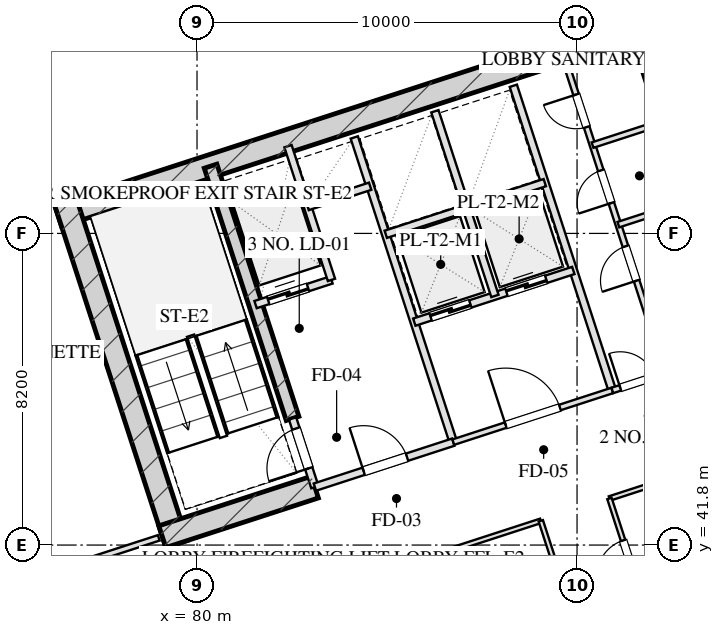
"""IFC4 building model, lengths in metres.
Left out: names, types, materials, properties, quantities, classifications, styles, units other than length and angle.
Written with IfcOpenShell. Run it as: python <this file> out.ifc"""

import sys

from ifc_helpers import new_model, si_unit, direction, frame, frame_2d, origin, place, context, subcontext, project, spatial, rectangle, extrude, element, fill, save


model = new_model("IFC4")
c1 = context("Model", 3, precision=1e-05, world=origin(), true_north=direction((0.0, 1.0)))
c2 = subcontext(c1, "Body", "Model", "MODEL_VIEW")
j1 = project(units=[si_unit("LENGTHUNIT", "METRE"), si_unit("PLANEANGLEUNIT", "RADIAN")], contexts=[c1])
p1 = place(None, origin())
s1 = spatial("IfcSite", under=j1, at=p1, CompositionType="ELEMENT")
p2 = place(p1, origin())
s2 = spatial("IfcBuilding", under=s1, at=p2, CompositionType="ELEMENT")
p3 = place(p2, frame((0.0, 0.0, 117.3)))
s3 = spatial("IfcBuildingStorey", under=s2, at=p3, CompositionType="ELEMENT", Elevation=117.3)
p4 = place(p3, frame((76.344, 50.466, 0.0), z_axis=(0.0, 0.0, 1.0), x_axis=(0.951055727519, 0.309019421968, 0.0)))
e1 = element("IfcWall", 1, at=p4, inside=s3, PredefinedType="SHEAR", context=c2, shape_type="SweptSolid", body=[
    extrude(rectangle(XDim=16.4, YDim=0.6, at=frame_2d((8.2, 0.0))), origin(), (0.0, 0.0, 1.0), 3.45),
])
for number, where, z_axis, x_axis in (
    (2, (79.466, 41.828, 0.0), (0.0, 0.0, 1.0), (-0.309, 0.951, 0.0)),
    (3, (94.492, 46.71, 0.0), (0.0, 0.0, 1.0), (-0.309, 0.951, 0.0)),
):
    element("IfcWall", number, at=place(p3, frame(where, z_axis=z_axis, x_axis=x_axis)), inside=s3, PredefinedType="SHEAR", context=c2, shape_type="SweptSolid", body=[
        extrude(rectangle(XDim=9.48, YDim=0.6, at=frame_2d((4.74, 0.0))), origin(), (0.0, 0.0, 1.0), 3.45),
    ])
p5 = place(p3, frame((82.514, 45.131, 0.0), z_axis=(0.0, 0.0, 1.0), x_axis=(-0.308988790936, 0.951065679686, 0.0)))
e4 = element("IfcWall", 4, at=p5, inside=s3, PredefinedType="SHEAR", context=c2, shape_type="SweptSolid", body=[
    extrude(rectangle(XDim=6.98, YDim=0.35, at=frame_2d((3.49, 0.0))), origin(), (0.0, 0.0, 1.0), 3.45),
])
p6 = place(p3, frame((79.087, 42.021, 0.0), z_axis=(0.0, 0.0, 1.0), x_axis=(0.951062550203, 0.3089984233, 0.0)))
e5 = element("IfcWall", 5, at=p6, inside=s3, PredefinedType="SHEAR", context=c2, shape_type="SweptSolid", body=[
    extrude(rectangle(XDim=4.22, YDim=0.6, at=frame_2d((2.11, 0.0))), origin(), (0.0, 0.0, 1.0), 3.45),
])
p7 = place(p3, frame((80.716, 6.59, 0.0), z_axis=(0.0, 0.0, 1.0), x_axis=(-0.309017542002, 0.95105633836, 0.0)))
e6 = element("IfcWall", 6, at=p7, inside=s3, PredefinedType="SOLIDWALL", context=c2, shape_type="SweptSolid", body=[
    extrude(rectangle(XDim=46.4, YDim=0.4, at=frame_2d((23.2, 0.0))), origin(), (0.0, 0.0, 1.0), 2.61),
])
p8 = place(p7, frame((15.6, 0.0, 0.75)))
e7 = element("IfcOpeningElement", 7, at=p8, cuts=e6, PredefinedType="OPENING", context=c2, shape_type="SweptSolid", body=[
    extrude(rectangle(XDim=2.4, YDim=1.46, at=frame_2d((1.2, 0.73))), frame((0.0, 0.21, 0.0), z_axis=(0.0, -1.0, 0.0), x_axis=(1.0, 0.0, 0.0)), (0.0, 0.0, 1.0), 0.42),
])
p9 = place(p7, frame((28.4, 0.0, 0.75)))
e8 = element("IfcOpeningElement", 8, at=p9, cuts=e6, PredefinedType="OPENING", context=c2, shape_type="SweptSolid", body=[
    extrude(rectangle(XDim=2.4, YDim=1.46, at=frame_2d((1.2, 0.73))), frame((0.0, 0.21, 0.0), z_axis=(0.0, -1.0, 0.0), x_axis=(1.0, 0.0, 0.0)), (0.0, 0.0, 1.0), 0.42),
])
p10 = place(p3, frame((68.047, 53.995, 0.0), z_axis=(0.0, 0.0, 1.0), x_axis=(0.95105505922, 0.309021478754, 0.0)))
e9 = element("IfcWall", 9, at=p10, inside=s3, PredefinedType="SOLIDWALL", context=c2, shape_type="SweptSolid", body=[
    extrude(rectangle(XDim=29.4, YDim=0.4, at=frame_2d((14.7, 0.0))), origin(), (0.0, 0.0, 1.0), 2.61),
])
p11 = place(p3, frame((83.101, 43.324, 0.0), z_axis=(0.0, 0.0, 1.0), x_axis=(-0.309048298632, 0.951046344356, 0.0)))
e10 = element("IfcWall", 10, at=p11, inside=s3, PredefinedType="PARTITIONING", context=c2, shape_type="SweptSolid", body=[
    extrude(rectangle(XDim=1.9, YDim=0.2, at=frame_2d((0.95, 0.0))), origin(), (0.0, 0.0, 1.0), 3.175),
])
p12 = place(p11, frame((0.52, 0.0, 0.0)))
e11 = element("IfcOpeningElement", 11, at=p12, cuts=e10, PredefinedType="OPENING", context=c2, shape_type="SweptSolid", body=[
    extrude(rectangle(XDim=1.1, YDim=2.05, at=frame_2d((0.55, 1.025))), frame((0.0, 0.11, 0.0), z_axis=(0.0, -1.0, 0.0), x_axis=(1.0, 0.0, 0.0)), (0.0, 0.0, 1.0), 0.22),
])
p13 = place(p3, frame((86.743, 44.508, 0.0), z_axis=(0.0, 0.0, 1.0), x_axis=(-0.309016001439, 0.951056838919, 0.0)))
e12 = element("IfcWall", 12, at=p13, inside=s3, PredefinedType="PARTITIONING", context=c2, shape_type="SweptSolid", body=[
    extrude(rectangle(XDim=8.43, YDim=0.2, at=frame_2d((4.215, 0.0))), origin(), (0.0, 0.0, 1.0), 3.175),
])
p14 = place(p3, frame((83.101, 43.324, 0.0), z_axis=(0.0, 0.0, 1.0), x_axis=(0.951052804469, 0.309028417967, 0.0)))
e13 = element("IfcWall", 13, at=p14, inside=s3, PredefinedType="PARTITIONING", context=c2, shape_type="SweptSolid", body=[
    extrude(rectangle(XDim=3.83, YDim=0.2, at=frame_2d((1.915, 0.0))), origin(), (0.0, 0.0, 1.0), 3.175),
])
p15 = place(p14, frame((1.35, 0.0, 0.0)))
e14 = element("IfcOpeningElement", 14, at=p15, cuts=e13, PredefinedType="OPENING", context=c2, shape_type="SweptSolid", body=[
    extrude(rectangle(XDim=1.2, YDim=2.05, at=frame_2d((0.6, 1.025))), frame((0.0, 0.11, 0.0), z_axis=(0.0, -1.0, 0.0), x_axis=(1.0, 0.0, 0.0)), (0.0, 0.0, 1.0), 0.22),
])
p16 = place(p3, frame((81.54, 48.127, 0.0), z_axis=(0.0, 0.0, 1.0), x_axis=(0.951062257173, 0.308999325213, 0.0)))
e15 = element("IfcWall", 15, at=p16, inside=s3, PredefinedType="PARTITIONING", context=c2, shape_type="SweptSolid", body=[
    extrude(rectangle(XDim=2.1, YDim=0.2, at=frame_2d((1.05, 0.0))), origin(), (0.0, 0.0, 1.0), 3.175),
])
p17 = place(p16, frame((0.35, 0.0, 0.0)))
e16 = element("IfcOpeningElement", 16, at=p17, cuts=e15, PredefinedType="OPENING", context=c2, shape_type="SweptSolid", body=[
    extrude(rectangle(XDim=1.1, YDim=2.05, at=frame_2d((0.55, 1.025))), frame((0.0, 0.11, 0.0), z_axis=(0.0, -1.0, 0.0), x_axis=(1.0, 0.0, 0.0)), (0.0, 0.0, 1.0), 0.22),
])
p18 = place(p3, frame((83.538, 48.776, 0.0), z_axis=(0.0, 0.0, 1.0), x_axis=(-0.3089935693, 0.951064127245, 0.0)))
e17 = element("IfcWall", 17, at=p18, inside=s3, PredefinedType="PARTITIONING", context=c2, shape_type="SweptSolid", body=[
    extrude(rectangle(XDim=3.7, YDim=0.2, at=frame_2d((1.85, 0.0))), origin(), (0.0, 0.0, 1.0), 3.175),
])
p19 = place(p3, frame((82.91, 50.707, 0.0), z_axis=(0.0, 0.0, 1.0), x_axis=(0.951041328149, 0.309063734775, 0.0)))
e18 = element("IfcWall", 18, at=p19, inside=s3, PredefinedType="PARTITIONING", context=c2, shape_type="SweptSolid", body=[
    extrude(rectangle(XDim=1.73, YDim=0.2, at=frame_2d((0.865, 0.0))), origin(), (0.0, 0.0, 1.0), 3.175),
])
p20 = place(p3, frame((90.928, 45.868, 0.0), z_axis=(0.0, 0.0, 1.0), x_axis=(-0.309042196757, 0.951048327176, 0.0)))
e19 = element("IfcWall", 19, at=p20, inside=s3, PredefinedType="PARTITIONING", context=c2, shape_type="SweptSolid", body=[
    extrude(rectangle(XDim=8.43, YDim=0.2, at=frame_2d((4.215, 0.0))), origin(), (0.0, 0.0, 1.0), 3.175),
])
p21 = place(p3, frame((86.743, 44.508, 0.0), z_axis=(0.0, 0.0, 1.0), x_axis=(0.951063829732, 0.308994485023, 0.0)))
e20 = element("IfcWall", 20, at=p21, inside=s3, PredefinedType="PARTITIONING", context=c2, shape_type="SweptSolid", body=[
    extrude(rectangle(XDim=4.4, YDim=0.15, at=frame_2d((2.2, 0.0))), origin(), (0.0, 0.0, 1.0), 3.175),
])
p22 = place(p21, frame((1.45, 0.0, 0.0)))
e21 = element("IfcOpeningElement", 21, at=p22, cuts=e20, PredefinedType="OPENING", context=c2, shape_type="SweptSolid", body=[
    extrude(rectangle(XDim=1.5, YDim=2.05, at=frame_2d((0.75, 1.025))), frame((0.0, 0.085, 0.0), z_axis=(0.0, -1.0, 0.0), x_axis=(1.0, 0.0, 0.0)), (0.0, 0.0, 1.0), 0.17),
])
p23 = place(p3, frame((85.718, 47.666, 0.0), z_axis=(0.0, 0.0, 1.0), x_axis=(0.951058531764, 0.30901079133, 0.0)))
e22 = element("IfcWall", 22, at=p23, inside=s3, PredefinedType="PARTITIONING", context=c2, shape_type="SweptSolid", body=[
    extrude(rectangle(XDim=4.4, YDim=0.2, at=frame_2d((2.2, 0.0))), origin(), (0.0, 0.0, 1.0), 3.175),
])
p24 = place(p23, frame((0.45, 0.0, 0.0)))
e23 = element("IfcOpeningElement", 23, at=p24, cuts=e22, PredefinedType="OPENING", context=c2, shape_type="SweptSolid", body=[
    extrude(rectangle(XDim=1.1, YDim=2.05, at=frame_2d((0.55, 1.025))), frame((0.0, 0.11, 0.0), z_axis=(0.0, -1.0, 0.0), x_axis=(1.0, 0.0, 0.0)), (0.0, 0.0, 1.0), 0.22),
])
p25 = place(p23, frame((2.55, 0.0, 0.0)))
e24 = element("IfcOpeningElement", 24, at=p25, cuts=e22, PredefinedType="OPENING", context=c2, shape_type="SweptSolid", body=[
    extrude(rectangle(XDim=1.1, YDim=2.05, at=frame_2d((0.55, 1.025))), frame((0.0, 0.11, 0.0), z_axis=(0.0, -1.0, 0.0), x_axis=(1.0, 0.0, 0.0)), (0.0, 0.0, 1.0), 0.22),
])
p26 = place(p3, frame((87.838, 48.354, 0.0), z_axis=(0.0, 0.0, 1.0), x_axis=(-0.3090093719, 0.951058992953, 0.0)))
e25 = element("IfcWall", 25, at=p26, inside=s3, PredefinedType="PARTITIONING", context=c2, shape_type="SweptSolid", body=[
    extrude(rectangle(XDim=5.11, YDim=0.2, at=frame_2d((2.555, 0.0))), origin(), (0.0, 0.0, 1.0), 3.175),
])
p27 = place(p3, frame((84.967, 49.977, 0.0), z_axis=(0.0, 0.0, 1.0), x_axis=(0.951063829732, 0.308994485023, 0.0)))
e26 = element("IfcWall", 26, at=p27, inside=s3, PredefinedType="PARTITIONING", context=c2, shape_type="SweptSolid", body=[
    extrude(rectangle(XDim=4.4, YDim=0.2, at=frame_2d((2.2, 0.0))), origin(), (0.0, 0.0, 1.0), 3.175),
])
p28 = place(p3, frame((90.928, 45.868, 0.0), z_axis=(0.0, 0.0, 1.0), x_axis=(0.951059297078, 0.309008435874, 0.0)))
e27 = element("IfcWall", 27, at=p28, inside=s3, PredefinedType="PARTITIONING", context=c2, shape_type="SweptSolid", body=[
    extrude(rectangle(XDim=3.2, YDim=0.15, at=frame_2d((1.6, 0.0))), origin(), (0.0, 0.0, 1.0), 3.175),
])
p29 = place(p28, frame((0.22, 0.0, 0.0)))
e28 = element("IfcOpeningElement", 28, at=p29, cuts=e27, PredefinedType="OPENING", context=c2, shape_type="SweptSolid", body=[
    extrude(rectangle(XDim=0.95, YDim=2.05, at=frame_2d((0.475, 1.025))), frame((0.0, 0.085, 0.0), z_axis=(0.0, -1.0, 0.0), x_axis=(1.0, 0.0, 0.0)), (0.0, 0.0, 1.0), 0.17),
])
p30 = place(p3, frame((92.355, 46.331, 0.0), z_axis=(0.0, 0.0, 1.0), x_axis=(-0.309007490203, 0.951059604335, 0.0)))
e29 = element("IfcWall", 29, at=p30, inside=s3, PredefinedType="PARTITIONING", context=c2, shape_type="SweptSolid", body=[
    extrude(rectangle(XDim=8.43, YDim=0.15, at=frame_2d((4.215, 0.0))), origin(), (0.0, 0.0, 1.0), 3.175),
])
p31 = place(p30, frame((2.55, 0.0, 0.0)))
e30 = element("IfcOpeningElement", 30, at=p31, cuts=e29, PredefinedType="OPENING", context=c2, shape_type="SweptSolid", body=[
    extrude(rectangle(XDim=0.95, YDim=2.05, at=frame_2d((0.475, 1.025))), frame((0.0, 0.085, 0.0), z_axis=(0.0, -1.0, 0.0), x_axis=(1.0, 0.0, 0.0)), (0.0, 0.0, 1.0), 0.17),
])
p32 = place(p30, frame((4.7, 0.0, 0.0)))
e31 = element("IfcOpeningElement", 31, at=p32, cuts=e29, PredefinedType="OPENING", context=c2, shape_type="SweptSolid", body=[
    extrude(rectangle(XDim=0.9, YDim=2.05, at=frame_2d((0.45, 1.025))), frame((0.0, 0.085, 0.0), z_axis=(0.0, -1.0, 0.0), x_axis=(1.0, 0.0, 0.0)), (0.0, 0.0, 1.0), 0.17),
])
p33 = place(p30, frame((6.8, 0.0, 0.0)))
e32 = element("IfcOpeningElement", 32, at=p33, cuts=e29, PredefinedType="OPENING", context=c2, shape_type="SweptSolid", body=[
    extrude(rectangle(XDim=0.9, YDim=2.05, at=frame_2d((0.45, 1.025))), frame((0.0, 0.085, 0.0), z_axis=(0.0, -1.0, 0.0), x_axis=(1.0, 0.0, 0.0)), (0.0, 0.0, 1.0), 0.17),
])
p34 = place(p3, frame((91.088, 50.23, 0.0), z_axis=(0.0, 0.0, 1.0), x_axis=(0.951054116971, 0.309024378638, 0.0)))
e33 = element("IfcWall", 33, at=p34, inside=s3, PredefinedType="PARTITIONING", context=c2, shape_type="SweptSolid", body=[
    extrude(rectangle(XDim=1.7, YDim=0.15, at=frame_2d((0.85, 0.0))), origin(), (0.0, 0.0, 1.0), 3.175),
])
p35 = place(p3, frame((90.408, 52.323, 0.0), z_axis=(0.0, 0.0, 1.0), x_axis=(0.951040401051, 0.309066587596, 0.0)))
e34 = element("IfcWall", 34, at=p35, inside=s3, PredefinedType="PARTITIONING", context=c2, shape_type="SweptSolid", body=[
    extrude(rectangle(XDim=1.7, YDim=0.15, at=frame_2d((0.85, 0.0))), origin(), (0.0, 0.0, 1.0), 3.175),
])
p36 = place(p3, frame((70.338, 39.177, 0.0), z_axis=(0.0, 0.0, 1.0), x_axis=(0.951059695568, 0.309007209409, 0.0)))
e35 = element("IfcWall", 35, at=p36, inside=s3, PredefinedType="PARTITIONING", context=c2, shape_type="SweptSolid", body=[
    extrude(rectangle(XDim=9.1, YDim=0.15, at=frame_2d((4.55, 0.0))), origin(), (0.0, 0.0, 1.0), 3.175),
])
p37 = place(p36, frame((3.822, 0.0, 0.0)))
e36 = element("IfcOpeningElement", 36, at=p37, cuts=e35, PredefinedType="OPENING", context=c2, shape_type="SweptSolid", body=[
    extrude(rectangle(XDim=1.05, YDim=2.05, at=frame_2d((0.525, 1.025))), frame((0.0, 0.085, 0.0), z_axis=(0.0, -1.0, 0.0), x_axis=(1.0, 0.0, 0.0)), (0.0, 0.0, 1.0), 0.17),
])
p38 = place(p3, frame((81.532, 39.997, 0.0), z_axis=(0.0, 0.0, 1.0), x_axis=(0.951048148493, 0.309042746635, 0.0)))
e37 = element("IfcWall", 37, at=p38, inside=s3, PredefinedType="PARTITIONING", context=c2, shape_type="SweptSolid", body=[
    extrude(rectangle(XDim=7.9, YDim=0.12, at=frame_2d((3.95, 0.0))), origin(), (0.0, 0.0, 1.0), 3.175),
])
p39 = place(p3, frame((90.853, 43.025, 0.0), z_axis=(0.0, 0.0, 1.0), x_axis=(0.951054001411, 0.309024734286, 0.0)))
e38 = element("IfcWall", 38, at=p39, inside=s3, PredefinedType="PARTITIONING", context=c2, shape_type="SweptSolid", body=[
    extrude(rectangle(XDim=13.5, YDim=0.12, at=frame_2d((6.75, 0.0))), origin(), (0.0, 0.0, 1.0), 3.175),
])
p40 = place(p3, frame((94.188, 26.613, 0.0), z_axis=(0.0, 0.0, 1.0), x_axis=(-0.30901773025, 0.951056277195, 0.0)))
e39 = element("IfcWall", 39, at=p40, inside=s3, PredefinedType="PARTITIONING", context=c2, shape_type="SweptSolid", body=[
    extrude(rectangle(XDim=16.64, YDim=0.12, at=frame_2d((8.32, 0.0))), origin(), (0.0, 0.0, 1.0), 3.175),
])
p41 = place(p40, frame((9.304, 0.0, 0.0)))
e40 = element("IfcOpeningElement", 40, at=p41, cuts=e39, PredefinedType="OPENING", context=c2, shape_type="SweptSolid", body=[
    extrude(rectangle(XDim=1.1, YDim=2.05, at=frame_2d((0.55, 1.025))), frame((0.0, 0.07, 0.0), z_axis=(0.0, -1.0, 0.0), x_axis=(1.0, 0.0, 0.0)), (0.0, 0.0, 1.0), 0.14),
])
p42 = place(p3, frame((95.995, 27.2, 0.0), z_axis=(0.0, 0.0, 1.0), x_axis=(-0.309022042254, 0.951054876125, 0.0)))
e41 = element("IfcWall", 41, at=p42, inside=s3, PredefinedType="PARTITIONING", context=c2, shape_type="SweptSolid", body=[
    extrude(rectangle(XDim=16.64, YDim=0.12, at=frame_2d((8.32, 0.0))), origin(), (0.0, 0.0, 1.0), 3.175),
])
p43 = place(p42, frame((1.16, 0.0, 0.0)))
e42 = element("IfcOpeningElement", 42, at=p43, cuts=e41, PredefinedType="OPENING", context=c2, shape_type="SweptSolid", body=[
    extrude(rectangle(XDim=1.0, YDim=2.05, at=frame_2d((0.5, 1.025))), frame((0.0, 0.07, 0.0), z_axis=(0.0, -1.0, 0.0), x_axis=(1.0, 0.0, 0.0)), (0.0, 0.0, 1.0), 0.14),
])
p44 = place(p42, frame((5.48, 0.0, 0.0)))
e43 = element("IfcOpeningElement", 43, at=p44, cuts=e41, PredefinedType="OPENING", context=c2, shape_type="SweptSolid", body=[
    extrude(rectangle(XDim=1.0, YDim=2.05, at=frame_2d((0.5, 1.025))), frame((0.0, 0.07, 0.0), z_axis=(0.0, -1.0, 0.0), x_axis=(1.0, 0.0, 0.0)), (0.0, 0.0, 1.0), 0.14),
])
p45 = place(p42, frame((9.48, 0.0, 0.0)))
e44 = element("IfcOpeningElement", 44, at=p45, cuts=e41, PredefinedType="OPENING", context=c2, shape_type="SweptSolid", body=[
    extrude(rectangle(XDim=1.0, YDim=2.05, at=frame_2d((0.5, 1.025))), frame((0.0, 0.07, 0.0), z_axis=(0.0, -1.0, 0.0), x_axis=(1.0, 0.0, 0.0)), (0.0, 0.0, 1.0), 0.14),
])
p46 = place(p42, frame((14.48, 0.0, 0.0)))
e45 = element("IfcOpeningElement", 45, at=p46, cuts=e41, PredefinedType="OPENING", context=c2, shape_type="SweptSolid", body=[
    extrude(rectangle(XDim=1.0, YDim=2.05, at=frame_2d((0.5, 1.025))), frame((0.0, 0.07, 0.0), z_axis=(0.0, -1.0, 0.0), x_axis=(1.0, 0.0, 0.0)), (0.0, 0.0, 1.0), 0.14),
])
p47 = place(p12, origin())
e46 = element("IfcDoor", 46, at=p47, inside=s3, OperationType="SINGLE_SWING_LEFT", PredefinedType="DOOR", context=c2, shape_type="SweptSolid", body=[
    extrude(rectangle(XDim=1.1, YDim=2.05, at=frame_2d((0.55, 1.025))), frame((0.0, 0.025, 0.0), z_axis=(0.0, -1.0, 0.0), x_axis=(1.0, 0.0, 0.0)), (0.0, 0.0, 1.0), 0.05),
])
fill(e11, e46)
p48 = place(p15, origin())
e47 = element("IfcDoor", 47, at=p48, inside=s3, OperationType="SINGLE_SWING_LEFT", PredefinedType="DOOR", context=c2, shape_type="SweptSolid", body=[
    extrude(rectangle(XDim=1.2, YDim=2.05, at=frame_2d((0.6, 1.025))), frame((0.0, 0.025, 0.0), z_axis=(0.0, -1.0, 0.0), x_axis=(1.0, 0.0, 0.0)), (0.0, 0.0, 1.0), 0.05),
])
fill(e14, e47)
p49 = place(p17, origin())
e48 = element("IfcDoor", 48, at=p49, inside=s3, OperationType="DOUBLE_DOOR_SLIDING", PredefinedType="DOOR", context=c2, shape_type="SweptSolid", body=[
    extrude(rectangle(XDim=1.1, YDim=2.05, at=frame_2d((0.55, 1.025))), frame((0.0, 0.025, 0.0), z_axis=(0.0, -1.0, 0.0), x_axis=(1.0, 0.0, 0.0)), (0.0, 0.0, 1.0), 0.05),
])
fill(e16, e48)
p50 = place(p22, origin())
e49 = element("IfcDoor", 49, at=p50, inside=s3, OperationType="SINGLE_SWING_LEFT", PredefinedType="DOOR", context=c2, shape_type="SweptSolid", body=[
    extrude(rectangle(XDim=1.5, YDim=2.05, at=frame_2d((0.75, 1.025))), frame((0.0, 0.025, 0.0), z_axis=(0.0, -1.0, 0.0), x_axis=(1.0, 0.0, 0.0)), (0.0, 0.0, 1.0), 0.05),
])
fill(e21, e49)
p51 = place(p24, origin())
e50 = element("IfcDoor", 50, at=p51, inside=s3, OperationType="DOUBLE_DOOR_SLIDING", PredefinedType="DOOR", context=c2, shape_type="SweptSolid", body=[
    extrude(rectangle(XDim=1.1, YDim=2.05, at=frame_2d((0.55, 1.025))), frame((0.0, 0.025, 0.0), z_axis=(0.0, -1.0, 0.0), x_axis=(1.0, 0.0, 0.0)), (0.0, 0.0, 1.0), 0.05),
])
fill(e23, e50)
p52 = place(p25, origin())
e51 = element("IfcDoor", 51, at=p52, inside=s3, OperationType="DOUBLE_DOOR_SLIDING", PredefinedType="DOOR", context=c2, shape_type="SweptSolid", body=[
    extrude(rectangle(XDim=1.1, YDim=2.05, at=frame_2d((0.55, 1.025))), frame((0.0, 0.025, 0.0), z_axis=(0.0, -1.0, 0.0), x_axis=(1.0, 0.0, 0.0)), (0.0, 0.0, 1.0), 0.05),
])
fill(e24, e51)
p53 = place(p29, origin())
e52 = element("IfcDoor", 52, at=p53, inside=s3, OperationType="SINGLE_SWING_LEFT", PredefinedType="DOOR", context=c2, shape_type="SweptSolid", body=[
    extrude(rectangle(XDim=0.95, YDim=2.05, at=frame_2d((0.475, 1.025))), frame((0.0, 0.025, 0.0), z_axis=(0.0, -1.0, 0.0), x_axis=(1.0, 0.0, 0.0)), (0.0, 0.0, 1.0), 0.05),
])
fill(e28, e52)
p54 = place(p31, origin())
e53 = element("IfcDoor", 53, at=p54, inside=s3, OperationType="SINGLE_SWING_LEFT", PredefinedType="DOOR", context=c2, shape_type="SweptSolid", body=[
    extrude(rectangle(XDim=0.95, YDim=2.05, at=frame_2d((0.475, 1.025))), frame((0.0, 0.025, 0.0), z_axis=(0.0, -1.0, 0.0), x_axis=(1.0, 0.0, 0.0)), (0.0, 0.0, 1.0), 0.05),
])
fill(e30, e53)
p55 = place(p32, origin())
e54 = element("IfcDoor", 54, at=p55, inside=s3, OperationType="SINGLE_SWING_LEFT", PredefinedType="DOOR", context=c2, shape_type="SweptSolid", body=[
    extrude(rectangle(XDim=0.9, YDim=2.05, at=frame_2d((0.45, 1.025))), frame((0.0, 0.025, 0.0), z_axis=(0.0, -1.0, 0.0), x_axis=(1.0, 0.0, 0.0)), (0.0, 0.0, 1.0), 0.05),
])
fill(e31, e54)
p56 = place(p33, origin())
e55 = element("IfcDoor", 55, at=p56, inside=s3, OperationType="SINGLE_SWING_RIGHT", PredefinedType="DOOR", context=c2, shape_type="SweptSolid", body=[
    extrude(rectangle(XDim=0.9, YDim=2.05, at=frame_2d((0.45, 1.025))), frame((0.0, 0.025, 0.0), z_axis=(0.0, -1.0, 0.0), x_axis=(1.0, 0.0, 0.0)), (0.0, 0.0, 1.0), 0.05),
])
fill(e32, e55)
p57 = place(p46, origin())
e56 = element("IfcDoor", 56, at=p57, inside=s3, OperationType="SINGLE_SWING_LEFT", PredefinedType="DOOR", context=c2, shape_type="SweptSolid", body=[
    extrude(rectangle(XDim=1.0, YDim=2.05, at=frame_2d((0.5, 1.025))), frame((0.0, 0.025, 0.0), z_axis=(0.0, -1.0, 0.0), x_axis=(1.0, 0.0, 0.0)), (0.0, 0.0, 1.0), 0.05),
])
fill(e45, e56)
save(model, sys.argv[1])
